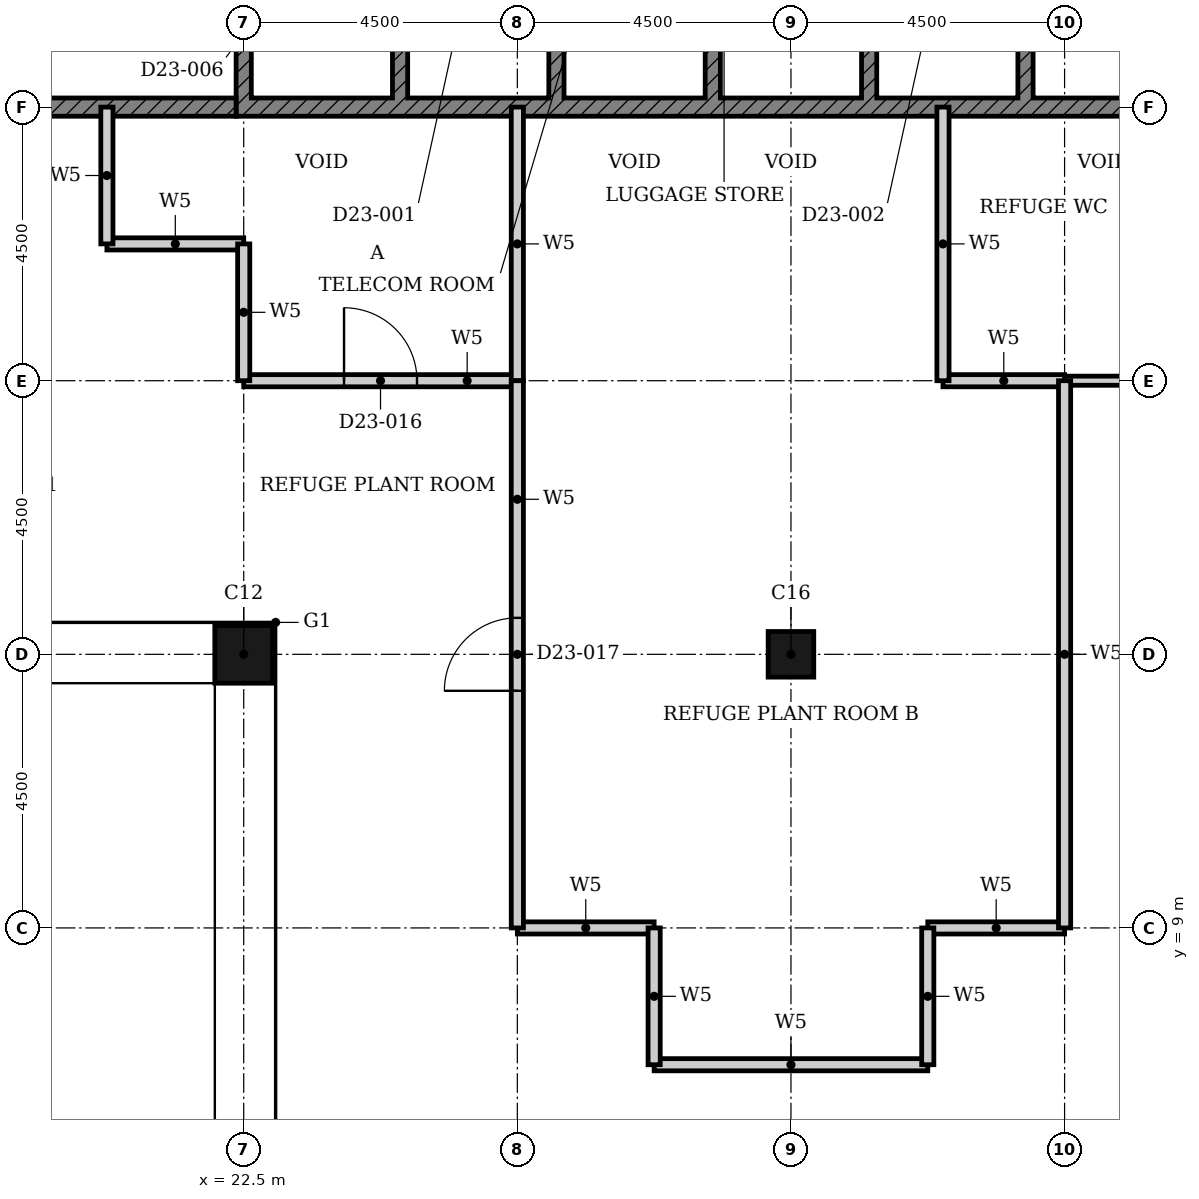
"""IFC4 building model, lengths in metres.
Left out: names, types, materials, properties, quantities, classifications, styles, units other than length and angle.
Written with IfcOpenShell. Run it as: python <this file> out.ifc"""

import sys

from ifc_helpers import new_model, si_unit, direction, frame, frame_2d, origin, origin_2d, place, context, subcontext, project, spatial, polyline, rectangle, hollow_rectangle, outline, extrude, element, fill, save


model = new_model("IFC4")
c1 = context("Model", 3, precision=1e-05, world=origin(), true_north=direction((0.0, 1.0)))
c2 = subcontext(c1, "Body", "Model", "MODEL_VIEW")
j1 = project(units=[si_unit("LENGTHUNIT", "METRE"), si_unit("PLANEANGLEUNIT", "RADIAN")], contexts=[c1])
p1 = place(None, origin())
s1 = spatial("IfcSite", under=j1, at=p1, CompositionType="ELEMENT")
p2 = place(p1, origin())
s2 = spatial("IfcBuilding", under=s1, at=p2, CompositionType="ELEMENT")
p3 = place(p2, frame((0.0, 0.0, 96.0)))
s3 = spatial("IfcBuildingStorey", under=s2, at=p3, CompositionType="ELEMENT", Elevation=96.0)
p4 = place(p3, frame((22.5, 13.5, 0.0), z_axis=(0.0, 0.0, 1.0), x_axis=(1.0, 0.0, 0.0)))
e1 = element("IfcColumn", 1, at=p4, inside=s3, PredefinedType="COLUMN", context=c2, shape_type="SweptSolid", body=[
    extrude(hollow_rectangle(XDim=0.95, YDim=0.95, WallThickness=0.03, at=origin_2d()), origin(), (0.0, 0.0, 1.0), 4.8),
])
p5 = place(p3, frame((31.5, 13.5, 0.0), z_axis=(0.0, 0.0, 1.0), x_axis=(1.0, 0.0, 0.0)))
e2 = element("IfcColumn", 2, at=p5, inside=s3, PredefinedType="COLUMN", context=c2, shape_type="SweptSolid", body=[
    extrude(hollow_rectangle(XDim=0.75, YDim=0.75, WallThickness=0.024, at=origin_2d()), origin(), (0.0, 0.0, 1.0), 4.8),
])
p6 = place(p3, origin())
e3 = element("IfcWall", 3, at=p6, inside=s3, PredefinedType="SHEAR", context=c2, shape_type="SweptSolid", body=[
    extrude(outline(polyline([(22.375, 22.35), (38.053, 22.35), (38.053, 25.275), (37.803, 25.275), (37.803, 22.65), (35.482, 22.65), (35.482, 25.275), (35.232, 25.275), (35.232, 22.65), (32.911, 22.65), (32.911, 25.275), (32.661, 25.275), (32.661, 22.65), (30.339, 22.65), (30.339, 25.275), (30.089, 25.275), (30.089, 22.65), (27.768, 22.65), (27.768, 25.275), (27.518, 25.275), (27.518, 22.65), (25.197, 22.65), (25.197, 25.275), (24.947, 25.275), (24.947, 22.65), (22.625, 22.65), (22.625, 25.275), (22.375, 25.275), (22.375, 22.35)])), origin(), (0.0, 0.0, 1.0), 4.5),
])
p7 = place(p3, frame((18.15, 22.5, 0.0), z_axis=(0.0, 0.0, 1.0), x_axis=(1.0, 0.0, 0.0)))
e4 = element("IfcWall", 4, at=p7, inside=s3, PredefinedType="SHEAR", context=c2, shape_type="SweptSolid", body=[
    extrude(rectangle(XDim=4.225, YDim=0.3, at=frame_2d((2.113, 0.0))), origin(), (0.0, 0.0, 1.0), 4.5),
])
p8 = place(p3, frame((36.0, 18.0, 0.0), z_axis=(0.0, 0.0, 1.0), x_axis=(1.0, 0.0, 0.0)))
e5 = element("IfcWall", 5, at=p8, inside=s3, PredefinedType="PARTITIONING", context=c2, shape_type="SweptSolid", body=[
    extrude(rectangle(XDim=2.0, YDim=0.15, at=frame_2d((1.0, 0.0))), origin(), (0.0, 0.0, 1.0), 4.5),
])
p9 = place(p3, frame((22.5, 18.0, 0.0), z_axis=(0.0, 0.0, 1.0), x_axis=(1.0, 0.0, 0.0)))
e6 = element("IfcWall", 6, at=p9, inside=s3, PredefinedType="PARTITIONING", context=c2, shape_type="SweptSolid", body=[
    extrude(rectangle(XDim=4.5, YDim=0.2, at=frame_2d((2.25, 0.0))), origin(), (0.0, 0.0, 1.0), 4.5),
])
p10 = place(p9, frame((1.65, 0.0, 0.0)))
e7 = element("IfcOpeningElement", 7, at=p10, cuts=e6, PredefinedType="OPENING", context=c2, shape_type="SweptSolid", body=[
    extrude(rectangle(XDim=1.2, YDim=2.1, at=frame_2d((0.6, 1.05))), frame((0.0, 0.11, 0.0), z_axis=(0.0, -1.0, 0.0), x_axis=(1.0, 0.0, 0.0)), (0.0, 0.0, 1.0), 0.22),
])
p11 = place(p3, frame((34.0, 18.0, 0.0), z_axis=(0.0, 0.0, 1.0), x_axis=(1.0, 0.0, 0.0)))
e8 = element("IfcWall", 8, at=p11, inside=s3, PredefinedType="PARTITIONING", context=c2, shape_type="SweptSolid", body=[
    extrude(rectangle(XDim=2.0, YDim=0.2, at=frame_2d((1.0, 0.0))), origin(), (0.0, 0.0, 1.0), 4.5),
])
p12 = place(p3, frame((20.25, 20.25, 0.0), z_axis=(0.0, 0.0, 1.0), x_axis=(1.0, 0.0, 0.0)))
e9 = element("IfcWall", 9, at=p12, inside=s3, PredefinedType="PARTITIONING", context=c2, shape_type="SweptSolid", body=[
    extrude(rectangle(XDim=2.25, YDim=0.2, at=frame_2d((1.125, 0.0))), origin(), (0.0, 0.0, 1.0), 4.5),
])
p13 = place(p3, frame((29.25, 6.75, 0.0), z_axis=(0.0, 0.0, 1.0), x_axis=(1.0, 0.0, 0.0)))
e10 = element("IfcWall", 10, at=p13, inside=s3, PredefinedType="PARTITIONING", context=c2, shape_type="SweptSolid", body=[
    extrude(rectangle(XDim=4.5, YDim=0.2, at=frame_2d((2.25, 0.0))), origin(), (0.0, 0.0, 1.0), 4.5),
])
for number, where, z_axis, x_axis in (
    (11, (27.0, 9.0, 0.0), (0.0, 0.0, 1.0), (1.0, 0.0, 0.0)),
    (12, (33.75, 9.0, 0.0), (0.0, 0.0, 1.0), (1.0, 0.0, 0.0)),
    (13, (20.25, 20.25, 0.0), (0.0, 0.0, 1.0), (0.0, 1.0, 0.0)),
    (14, (22.5, 18.0, 0.0), (0.0, 0.0, 1.0), (0.0, 1.0, 0.0)),
):
    element("IfcWall", number, at=place(p3, frame(where, z_axis=z_axis, x_axis=x_axis)), inside=s3, PredefinedType="PARTITIONING", context=c2, shape_type="SweptSolid", body=[
        extrude(rectangle(XDim=2.25, YDim=0.2, at=frame_2d((1.125, 0.0))), origin(), (0.0, 0.0, 1.0), 4.5),
    ])
p14 = place(p3, frame((27.0, 18.0, 0.0), z_axis=(0.0, 0.0, 1.0), x_axis=(0.0, 1.0, 0.0)))
e15 = element("IfcWall", 15, at=p14, inside=s3, PredefinedType="PARTITIONING", context=c2, shape_type="SweptSolid", body=[
    extrude(rectangle(XDim=4.5, YDim=0.2, at=frame_2d((2.25, 0.0))), origin(), (0.0, 0.0, 1.0), 4.5),
])
p15 = place(p3, frame((27.0, 9.0, 0.0), z_axis=(0.0, 0.0, 1.0), x_axis=(0.0, 1.0, 0.0)))
e16 = element("IfcWall", 16, at=p15, inside=s3, PredefinedType="PARTITIONING", context=c2, shape_type="SweptSolid", body=[
    extrude(rectangle(XDim=9.0, YDim=0.2, at=frame_2d((4.5, 0.0))), origin(), (0.0, 0.0, 1.0), 3.78),
])
p16 = place(p15, frame((3.9, 0.0, 0.0)))
e17 = element("IfcOpeningElement", 17, at=p16, cuts=e16, PredefinedType="OPENING", context=c2, shape_type="SweptSolid", body=[
    extrude(rectangle(XDim=1.2, YDim=2.1, at=frame_2d((0.6, 1.05))), frame((0.0, 0.11, 0.0), z_axis=(0.0, -1.0, 0.0), x_axis=(1.0, 0.0, 0.0)), (0.0, 0.0, 1.0), 0.22),
])
for number, where, z_axis, x_axis in (
    (18, (29.25, 6.75, 0.0), (0.0, 0.0, 1.0), (0.0, 1.0, 0.0)),
    (19, (33.75, 6.75, 0.0), (0.0, 0.0, 1.0), (0.0, 1.0, 0.0)),
):
    element("IfcWall", number, at=place(p3, frame(where, z_axis=z_axis, x_axis=x_axis)), inside=s3, PredefinedType="PARTITIONING", context=c2, shape_type="SweptSolid", body=[
        extrude(rectangle(XDim=2.25, YDim=0.2, at=frame_2d((1.125, 0.0))), origin(), (0.0, 0.0, 1.0), 4.5),
    ])
p17 = place(p3, frame((34.0, 18.0, 0.0), z_axis=(0.0, 0.0, 1.0), x_axis=(0.0, 1.0, 0.0)))
e20 = element("IfcWall", 20, at=p17, inside=s3, PredefinedType="PARTITIONING", context=c2, shape_type="SweptSolid", body=[
    extrude(rectangle(XDim=4.5, YDim=0.2, at=frame_2d((2.25, 0.0))), origin(), (0.0, 0.0, 1.0), 4.5),
])
p18 = place(p3, frame((36.0, 9.0, 0.0), z_axis=(0.0, 0.0, 1.0), x_axis=(0.0, 1.0, 0.0)))
e21 = element("IfcWall", 21, at=p18, inside=s3, PredefinedType="PARTITIONING", context=c2, shape_type="SweptSolid", body=[
    extrude(rectangle(XDim=9.0, YDim=0.2, at=frame_2d((4.5, 0.0))), origin(), (0.0, 0.0, 1.0), 3.78),
])
p19 = place(p10, origin())
e22 = element("IfcDoor", 22, at=p19, inside=s3, OperationType="SINGLE_SWING_RIGHT", PredefinedType="DOOR", context=c2, shape_type="SweptSolid", body=[
    extrude(rectangle(XDim=1.2, YDim=2.1, at=frame_2d((0.6, 1.05))), frame((0.0, 0.025, 0.0), z_axis=(0.0, -1.0, 0.0), x_axis=(1.0, 0.0, 0.0)), (0.0, 0.0, 1.0), 0.05),
])
fill(e7, e22)
p20 = place(p16, origin())
e23 = element("IfcDoor", 23, at=p20, inside=s3, OperationType="SINGLE_SWING_LEFT", PredefinedType="DOOR", context=c2, shape_type="SweptSolid", body=[
    extrude(rectangle(XDim=1.2, YDim=2.1, at=frame_2d((0.6, 1.05))), frame((0.0, 0.025, 0.0), z_axis=(0.0, -1.0, 0.0), x_axis=(1.0, 0.0, 0.0)), (0.0, 0.0, 1.0), 0.05),
])
fill(e17, e23)
save(model, sys.argv[1])
